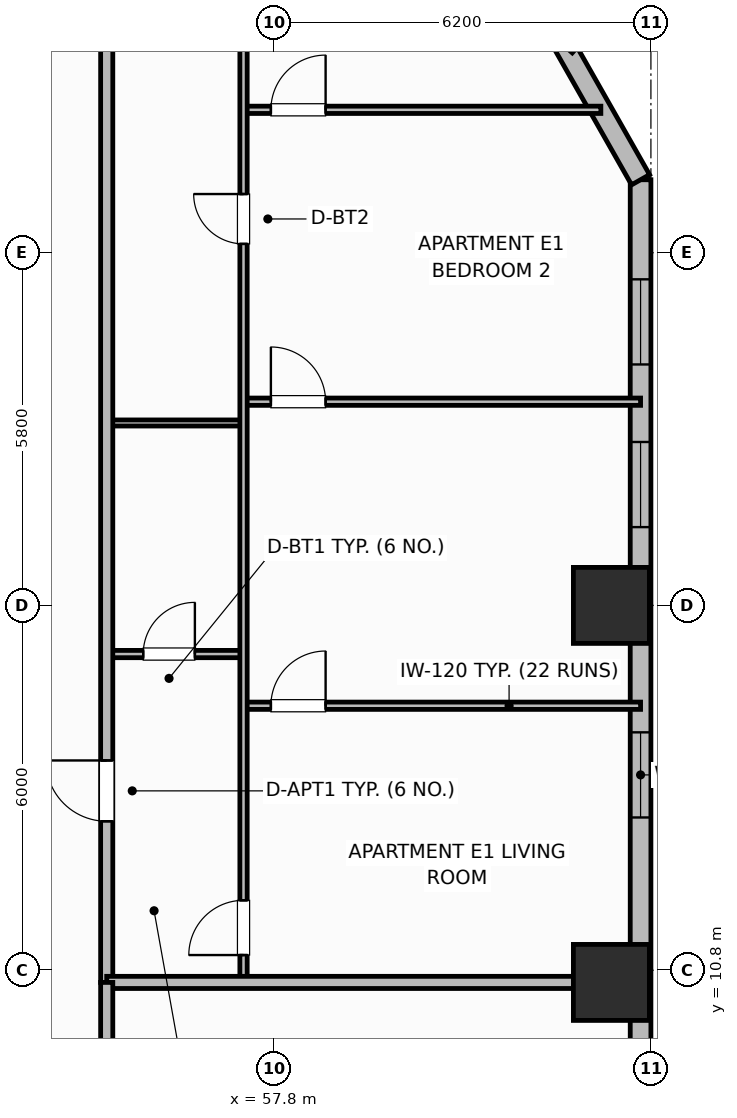
"""IFC4 building model, lengths in metres.
Left out: names, types, materials, properties, quantities, classifications, styles, units other than length and angle.
Written with IfcOpenShell. Run it as: python <this file> out.ifc"""

import sys

from ifc_helpers import new_model, si_unit, direction, frame, frame_2d, origin, origin_2d, place, context, subcontext, project, spatial, rectangle, extrude, element, fill, save


model = new_model("IFC4")
c1 = context("Model", 3, precision=1e-05, world=origin(), true_north=direction((0.0, 1.0)))
c2 = subcontext(c1, "Body", "Model", "MODEL_VIEW")
j1 = project(units=[si_unit("LENGTHUNIT", "METRE"), si_unit("PLANEANGLEUNIT", "RADIAN")], contexts=[c1])
p1 = place(None, origin())
s1 = spatial("IfcSite", under=j1, at=p1, CompositionType="ELEMENT")
p2 = place(p1, origin())
s2 = spatial("IfcBuilding", under=s1, at=p2, CompositionType="ELEMENT")
p3 = place(p2, frame((0.0, 0.0, 47.3)))
s3 = spatial("IfcBuildingStorey", under=s2, at=p3, CompositionType="ELEMENT", Elevation=47.3)
for number, where, z_axis, x_axis in (
    (1, (63.35, 10.6, 0.0), (0.0, 0.0, 1.0), (1.0, 0.0, 0.0)),
    (2, (63.35, 16.8, 0.0), (0.0, 0.0, 1.0), (1.0, 0.0, 0.0)),
):
    element("IfcColumn", number, at=place(p3, frame(where, z_axis=z_axis, x_axis=x_axis)), inside=s3, PredefinedType="COLUMN", context=c2, shape_type="SweptSolid", body=[
        extrude(rectangle(XDim=1.25, YDim=1.25, at=origin_2d()), origin(), (0.0, 0.0, 1.0), 3.7),
    ])
p4 = place(p3, frame((63.83, 9.0, 0.0), z_axis=(0.0, 0.0, 1.0), x_axis=(0.0, 1.0, 0.0)))
e3 = element("IfcWall", 3, at=p4, inside=s3, PredefinedType="SOLIDWALL", context=c2, shape_type="SweptSolid", body=[
    extrude(rectangle(XDim=14.8, YDim=0.34, at=frame_2d((7.4, 0.0))), origin(), (0.0, 0.0, 1.0), 2.7),
])
p5 = place(p4, frame((4.312, 0.0, 0.73)))
e4 = element("IfcOpeningElement", 4, at=p5, cuts=e3, PredefinedType="OPENING", context=c2, shape_type="SweptSolid", body=[
    extrude(rectangle(XDim=1.4, YDim=1.85, at=frame_2d((0.7, 0.925))), frame((0.0, 0.18, 0.0), z_axis=(0.0, -1.0, 0.0), x_axis=(1.0, 0.0, 0.0)), (0.0, 0.0, 1.0), 0.36),
])
p6 = place(p4, frame((9.087, 0.0, 0.73)))
e5 = element("IfcOpeningElement", 5, at=p6, cuts=e3, PredefinedType="OPENING", context=c2, shape_type="SweptSolid", body=[
    extrude(rectangle(XDim=1.4, YDim=1.85, at=frame_2d((0.7, 0.925))), frame((0.0, 0.18, 0.0), z_axis=(0.0, -1.0, 0.0), x_axis=(1.0, 0.0, 0.0)), (0.0, 0.0, 1.0), 0.36),
])
p7 = place(p4, frame((11.762, 0.0, 0.73)))
e6 = element("IfcOpeningElement", 6, at=p7, cuts=e3, PredefinedType="OPENING", context=c2, shape_type="SweptSolid", body=[
    extrude(rectangle(XDim=1.4, YDim=1.85, at=frame_2d((0.7, 0.925))), frame((0.0, 0.18, 0.0), z_axis=(0.0, -1.0, 0.0), x_axis=(1.0, 0.0, 0.0)), (0.0, 0.0, 1.0), 0.36),
])
p8 = place(p3, frame((63.83, 23.8, 0.0), z_axis=(0.0, 0.0, 1.0), x_axis=(-0.494017696272, 0.869451847873, 0.0)))
e7 = element("IfcWall", 7, at=p8, inside=s3, PredefinedType="SOLIDWALL", context=c2, shape_type="SweptSolid", body=[
    extrude(rectangle(XDim=2.53, YDim=0.34, at=frame_2d((1.265, 0.0))), origin(), (0.0, 0.0, 1.0), 2.7),
])
p9 = place(p3, frame((62.58, 26.0, 0.0), z_axis=(0.0, 0.0, 1.0), x_axis=(0.666041619974, 0.74591457987, 0.0)))
e8 = element("IfcWall", 8, at=p9, inside=s3, PredefinedType="SOLIDWALL", context=c2, shape_type="SweptSolid", body=[
    extrude(rectangle(XDim=1.877, YDim=0.34, at=frame_2d((0.938, 0.0))), origin(), (0.0, 0.0, 1.0), 2.7),
])
p10 = place(p9, frame((0.16, 0.0, 0.69)))
e9 = element("IfcOpeningElement", 9, at=p10, cuts=e8, PredefinedType="OPENING", context=c2, shape_type="SweptSolid", body=[
    extrude(rectangle(XDim=1.4, YDim=1.85, at=frame_2d((0.7, 0.925))), frame((0.0, 0.18, 0.0), z_axis=(0.0, -1.0, 0.0), x_axis=(1.0, 0.0, 0.0)), (0.0, 0.0, 1.0), 0.36),
])
p11 = place(p3, frame((55.05, 16.0, 0.0), z_axis=(0.0, 0.0, 1.0), x_axis=(1.0, 0.0, 0.0)))
e10 = element("IfcWall", 10, at=p11, inside=s3, PredefinedType="PARTITIONING", context=c2, shape_type="SweptSolid", body=[
    extrude(rectangle(XDim=2.25, YDim=0.12, at=frame_2d((1.125, 0.0))), origin(), (0.0, 0.0, 1.0), 2.53),
])
p12 = place(p11, frame((0.6, 0.0, 0.0)))
e11 = element("IfcOpeningElement", 11, at=p12, cuts=e10, PredefinedType="OPENING", context=c2, shape_type="SweptSolid", body=[
    extrude(rectangle(XDim=0.85, YDim=2.1, at=frame_2d((0.425, 1.05))), frame((0.0, 0.07, 0.0), z_axis=(0.0, -1.0, 0.0), x_axis=(1.0, 0.0, 0.0)), (0.0, 0.0, 1.0), 0.14),
])
p13 = place(p3, frame((55.05, 19.8, 0.0), z_axis=(0.0, 0.0, 1.0), x_axis=(1.0, 0.0, 0.0)))
e12 = element("IfcWall", 12, at=p13, inside=s3, PredefinedType="PARTITIONING", context=c2, shape_type="SweptSolid", body=[
    extrude(rectangle(XDim=2.25, YDim=0.1, at=frame_2d((1.125, 0.0))), origin(), (0.0, 0.0, 1.0), 2.53),
])
p14 = place(p3, frame((57.3, 15.15, 0.0), z_axis=(0.0, 0.0, 1.0), x_axis=(1.0, 0.0, 0.0)))
e13 = element("IfcWall", 13, at=p14, inside=s3, PredefinedType="PARTITIONING", context=c2, shape_type="SweptSolid", body=[
    extrude(rectangle(XDim=6.53, YDim=0.12, at=frame_2d((3.265, 0.0))), origin(), (0.0, 0.0, 1.0), 2.53),
])
p15 = place(p14, frame((0.45, 0.0, 0.0)))
e14 = element("IfcOpeningElement", 14, at=p15, cuts=e13, PredefinedType="OPENING", context=c2, shape_type="SweptSolid", body=[
    extrude(rectangle(XDim=0.9, YDim=2.1, at=frame_2d((0.45, 1.05))), frame((0.0, 0.07, 0.0), z_axis=(0.0, -1.0, 0.0), x_axis=(1.0, 0.0, 0.0)), (0.0, 0.0, 1.0), 0.14),
])
p16 = place(p3, frame((57.3, 20.15, 0.0), z_axis=(0.0, 0.0, 1.0), x_axis=(1.0, 0.0, 0.0)))
e15 = element("IfcWall", 15, at=p16, inside=s3, PredefinedType="PARTITIONING", context=c2, shape_type="SweptSolid", body=[
    extrude(rectangle(XDim=6.53, YDim=0.12, at=frame_2d((3.265, 0.0))), origin(), (0.0, 0.0, 1.0), 2.53),
])
p17 = place(p16, frame((0.45, 0.0, 0.0)))
e16 = element("IfcOpeningElement", 16, at=p17, cuts=e15, PredefinedType="OPENING", context=c2, shape_type="SweptSolid", body=[
    extrude(rectangle(XDim=0.9, YDim=2.1, at=frame_2d((0.45, 1.05))), frame((0.0, 0.07, 0.0), z_axis=(0.0, -1.0, 0.0), x_axis=(1.0, 0.0, 0.0)), (0.0, 0.0, 1.0), 0.14),
])
p18 = place(p3, frame((57.3, 24.95, 0.0), z_axis=(0.0, 0.0, 1.0), x_axis=(1.0, 0.0, 0.0)))
e17 = element("IfcWall", 17, at=p18, inside=s3, PredefinedType="PARTITIONING", context=c2, shape_type="SweptSolid", body=[
    extrude(rectangle(XDim=5.876, YDim=0.12, at=frame_2d((2.938, 0.0))), origin(), (0.0, 0.0, 1.0), 2.53),
])
p19 = place(p18, frame((0.45, 0.0, 0.0)))
e18 = element("IfcOpeningElement", 18, at=p19, cuts=e17, PredefinedType="OPENING", context=c2, shape_type="SweptSolid", body=[
    extrude(rectangle(XDim=0.9, YDim=2.1, at=frame_2d((0.45, 1.05))), frame((0.0, 0.07, 0.0), z_axis=(0.0, -1.0, 0.0), x_axis=(1.0, 0.0, 0.0)), (0.0, 0.0, 1.0), 0.14),
])
p20 = place(p3, frame((57.3, 10.64, 0.0), z_axis=(0.0, 0.0, 1.0), x_axis=(0.0, 1.0, 0.0)))
e19 = element("IfcWall", 19, at=p20, inside=s3, PredefinedType="PARTITIONING", context=c2, shape_type="SweptSolid", body=[
    extrude(rectangle(XDim=19.12, YDim=0.12, at=frame_2d((9.56, 0.0))), origin(), (0.0, 0.0, 1.0), 2.53),
])
p21 = place(p20, frame((0.41, 0.0, 0.0)))
e20 = element("IfcOpeningElement", 20, at=p21, cuts=e19, PredefinedType="OPENING", context=c2, shape_type="SweptSolid", body=[
    extrude(rectangle(XDim=0.9, YDim=2.1, at=frame_2d((0.45, 1.05))), frame((0.0, 0.07, 0.0), z_axis=(0.0, -1.0, 0.0), x_axis=(1.0, 0.0, 0.0)), (0.0, 0.0, 1.0), 0.14),
])
p22 = place(p20, frame((12.105, 0.0, 0.0)))
e21 = element("IfcOpeningElement", 21, at=p22, cuts=e19, PredefinedType="OPENING", context=c2, shape_type="SweptSolid", body=[
    extrude(rectangle(XDim=0.82, YDim=2.08, at=frame_2d((0.41, 1.04))), frame((0.0, 0.07, 0.0), z_axis=(0.0, -1.0, 0.0), x_axis=(1.0, 0.0, 0.0)), (0.0, 0.0, 1.0), 0.14),
])
p23 = place(p3, frame((55.05, 10.6, 0.0), z_axis=(0.0, 0.0, 1.0), x_axis=(0.0, 1.0, 0.0)))
e22 = element("IfcWall", 22, at=p23, inside=s3, PredefinedType="PARTITIONING", context=c2, shape_type="SweptSolid", body=[
    extrude(rectangle(XDim=35.2, YDim=0.2, at=frame_2d((17.6, 0.0))), origin(), (0.0, 0.0, 1.0), 2.53),
])
p24 = place(p23, frame((2.65, 0.0, 0.0)))
e23 = element("IfcOpeningElement", 23, at=p24, cuts=e22, PredefinedType="OPENING", context=c2, shape_type="SweptSolid", body=[
    extrude(rectangle(XDim=1.0, YDim=2.15, at=frame_2d((0.5, 1.075))), frame((0.0, 0.11, 0.0), z_axis=(0.0, -1.0, 0.0), x_axis=(1.0, 0.0, 0.0)), (0.0, 0.0, 1.0), 0.22),
])
p25 = place(p23, frame((22.75, 0.0, 0.0)))
e24 = element("IfcOpeningElement", 24, at=p25, cuts=e22, PredefinedType="OPENING", context=c2, shape_type="SweptSolid", body=[
    extrude(rectangle(XDim=1.0, YDim=2.15, at=frame_2d((0.5, 1.075))), frame((0.0, 0.11, 0.0), z_axis=(0.0, -1.0, 0.0), x_axis=(1.0, 0.0, 0.0)), (0.0, 0.0, 1.0), 0.22),
])
p26 = place(p3, frame((55.05, 10.6, 0.0), z_axis=(0.0, 0.0, 1.0), x_axis=(1.0, 0.0, 0.0)))
e25 = element("IfcWall", 25, at=p26, inside=s3, PredefinedType="PARTITIONING", context=c2, shape_type="SweptSolid", body=[
    extrude(rectangle(XDim=8.36, YDim=0.2, at=frame_2d((4.18, 0.0))), origin(), (0.0, 0.0, 1.0), 2.53),
])
p27 = place(p3, frame((55.05, 4.97, 0.0), z_axis=(0.0, 0.0, 1.0), x_axis=(0.0, 1.0, 0.0)))
e26 = element("IfcWall", 26, at=p27, inside=s3, PredefinedType="PARTITIONING", context=c2, shape_type="SweptSolid", body=[
    extrude(rectangle(XDim=5.63, YDim=0.2, at=frame_2d((2.815, 0.0))), origin(), (0.0, 0.0, 1.0), 2.53),
])
p28 = place(p5, origin())
e27 = element("IfcWindow", 27, at=p28, inside=s3, PartitioningType="SINGLE_PANEL", PredefinedType="WINDOW", context=c2, shape_type="SweptSolid", body=[
    extrude(rectangle(XDim=1.4, YDim=1.85, at=frame_2d((0.7, 0.925))), frame((0.0, 0.03, 0.0), z_axis=(0.0, -1.0, 0.0), x_axis=(1.0, 0.0, 0.0)), (0.0, 0.0, 1.0), 0.06),
])
fill(e4, e27)
p29 = place(p6, origin())
e28 = element("IfcWindow", 28, at=p29, inside=s3, PartitioningType="SINGLE_PANEL", PredefinedType="WINDOW", context=c2, shape_type="SweptSolid", body=[
    extrude(rectangle(XDim=1.4, YDim=1.85, at=frame_2d((0.7, 0.925))), frame((0.0, 0.03, 0.0), z_axis=(0.0, -1.0, 0.0), x_axis=(1.0, 0.0, 0.0)), (0.0, 0.0, 1.0), 0.06),
])
fill(e5, e28)
p30 = place(p7, origin())
e29 = element("IfcWindow", 29, at=p30, inside=s3, PartitioningType="SINGLE_PANEL", PredefinedType="WINDOW", context=c2, shape_type="SweptSolid", body=[
    extrude(rectangle(XDim=1.4, YDim=1.85, at=frame_2d((0.7, 0.925))), frame((0.0, 0.03, 0.0), z_axis=(0.0, -1.0, 0.0), x_axis=(1.0, 0.0, 0.0)), (0.0, 0.0, 1.0), 0.06),
])
fill(e6, e29)
p31 = place(p12, origin())
e30 = element("IfcDoor", 30, at=p31, inside=s3, OperationType="SINGLE_SWING_RIGHT", PredefinedType="DOOR", context=c2, shape_type="SweptSolid", body=[
    extrude(rectangle(XDim=0.85, YDim=2.1, at=frame_2d((0.425, 1.05))), frame((0.0, 0.025, 0.0), z_axis=(0.0, -1.0, 0.0), x_axis=(1.0, 0.0, 0.0)), (0.0, 0.0, 1.0), 0.05),
])
fill(e11, e30)
p32 = place(p15, origin())
e31 = element("IfcDoor", 31, at=p32, inside=s3, OperationType="SINGLE_SWING_RIGHT", PredefinedType="DOOR", context=c2, shape_type="SweptSolid", body=[
    extrude(rectangle(XDim=0.9, YDim=2.1, at=frame_2d((0.45, 1.05))), frame((0.0, 0.025, 0.0), z_axis=(0.0, -1.0, 0.0), x_axis=(1.0, 0.0, 0.0)), (0.0, 0.0, 1.0), 0.05),
])
fill(e14, e31)
p33 = place(p17, origin())
e32 = element("IfcDoor", 32, at=p33, inside=s3, OperationType="SINGLE_SWING_LEFT", PredefinedType="DOOR", context=c2, shape_type="SweptSolid", body=[
    extrude(rectangle(XDim=0.9, YDim=2.1, at=frame_2d((0.45, 1.05))), frame((0.0, 0.025, 0.0), z_axis=(0.0, -1.0, 0.0), x_axis=(1.0, 0.0, 0.0)), (0.0, 0.0, 1.0), 0.05),
])
fill(e16, e32)
p34 = place(p19, origin())
e33 = element("IfcDoor", 33, at=p34, inside=s3, OperationType="SINGLE_SWING_RIGHT", PredefinedType="DOOR", context=c2, shape_type="SweptSolid", body=[
    extrude(rectangle(XDim=0.9, YDim=2.1, at=frame_2d((0.45, 1.05))), frame((0.0, 0.025, 0.0), z_axis=(0.0, -1.0, 0.0), x_axis=(1.0, 0.0, 0.0)), (0.0, 0.0, 1.0), 0.05),
])
fill(e18, e33)
p35 = place(p21, origin())
e34 = element("IfcDoor", 34, at=p35, inside=s3, OperationType="SINGLE_SWING_LEFT", PredefinedType="DOOR", context=c2, shape_type="SweptSolid", body=[
    extrude(rectangle(XDim=0.9, YDim=2.1, at=frame_2d((0.45, 1.05))), frame((0.0, 0.025, 0.0), z_axis=(0.0, -1.0, 0.0), x_axis=(1.0, 0.0, 0.0)), (0.0, 0.0, 1.0), 0.05),
])
fill(e20, e34)
p36 = place(p22, origin())
e35 = element("IfcDoor", 35, at=p36, inside=s3, OperationType="SINGLE_SWING_RIGHT", PredefinedType="DOOR", context=c2, shape_type="SweptSolid", body=[
    extrude(rectangle(XDim=0.82, YDim=2.08, at=frame_2d((0.41, 1.04))), frame((0.0, 0.025, 0.0), z_axis=(0.0, -1.0, 0.0), x_axis=(1.0, 0.0, 0.0)), (0.0, 0.0, 1.0), 0.05),
])
fill(e21, e35)
p37 = place(p24, origin())
e36 = element("IfcDoor", 36, at=p37, inside=s3, OperationType="SINGLE_SWING_RIGHT", PredefinedType="DOOR", context=c2, shape_type="SweptSolid", body=[
    extrude(rectangle(XDim=1.0, YDim=2.15, at=frame_2d((0.5, 1.075))), frame((0.0, 0.025, 0.0), z_axis=(0.0, -1.0, 0.0), x_axis=(1.0, 0.0, 0.0)), (0.0, 0.0, 1.0), 0.05),
])
fill(e23, e36)
save(model, sys.argv[1])
